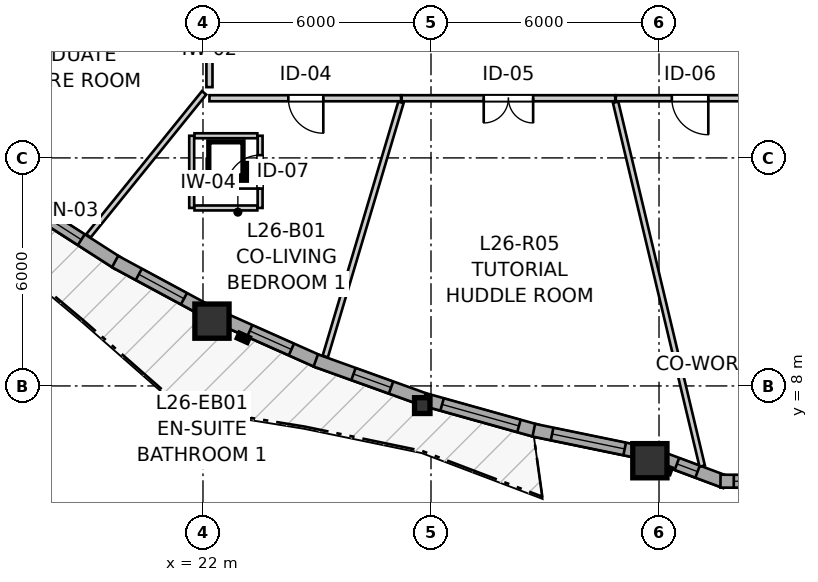
"""IFC4 building model, lengths in metres.
Left out: names, types, materials, properties, quantities, classifications, styles, units other than length and angle.
Written with IfcOpenShell. Run it as: python <this file> out.ifc"""

import sys

from ifc_helpers import new_model, si_unit, direction, frame, frame_2d, origin, origin_2d, place, context, subcontext, project, spatial, rectangle, i_section, extrude, source, transform, mapped, element, fill, save


model = new_model("IFC4")
c1 = context("Model", 3, precision=1e-05, world=origin(), true_north=direction((0.0, 1.0)))
c2 = subcontext(c1, "Body", "Model", "MODEL_VIEW")
j1 = project(units=[si_unit("LENGTHUNIT", "METRE"), si_unit("PLANEANGLEUNIT", "RADIAN")], contexts=[c1])
p1 = place(None, origin())
s1 = spatial("IfcSite", under=j1, at=p1, CompositionType="ELEMENT")
p2 = place(p1, origin())
s2 = spatial("IfcBuilding", under=s1, at=p2, CompositionType="ELEMENT")
p3 = place(p2, frame((0.0, 0.0, 89.6)))
s3 = spatial("IfcBuildingStorey", under=s2, at=p3, CompositionType="ELEMENT", Elevation=89.6)
m1 = source(origin(), c2, "Body", "SweptSolid", [
    extrude(rectangle(XDim=0.9, YDim=0.9, at=origin_2d()), origin(), (0.0, 0.0, 1.0), 2.95),
])
p4 = place(p3, frame((22.236, 9.705, 0.0), z_axis=(0.0, 0.0, 1.0), x_axis=(1.0, 0.0, 0.0)))
e1 = element("IfcColumn", 1, at=p4, inside=s3, PredefinedType="COLUMN", context=c2, shape_type="MappedRepresentation", body=[
    mapped(m1, transform((0.0, 0.0, 0.0), x_axis=(1.0, 0.0, 0.0), y_axis=(0.0, 1.0, 0.0), z_axis=(0.0, 0.0, 1.0), scale=1.0)),
])
m2 = source(origin(), c2, "Body", "SweptSolid", [
    extrude(i_section(OverallWidth=0.406, OverallDepth=0.416, WebThickness=0.027, FlangeThickness=0.044, FilletRadius=0.015, at=origin_2d()), origin(), (0.0, 0.0, 1.0), 2.95),
])
p5 = place(p3, frame((27.77, 7.483, 0.0), z_axis=(0.0, 0.0, 1.0), x_axis=(1.0, 0.0, 0.0)))
e2 = element("IfcColumn", 2, at=p5, inside=s3, PredefinedType="PILASTER", context=c2, shape_type="MappedRepresentation", body=[
    mapped(m2, transform((0.0, 0.0, 0.0), x_axis=(1.0, 0.0, 0.0), y_axis=(0.0, 1.0, 0.0), z_axis=(0.0, 0.0, 1.0), scale=1.0)),
])
p6 = place(p3, frame((33.76, 6.032, 0.0), z_axis=(0.0, 0.0, 1.0), x_axis=(1.0, 0.0, 0.0)))
e3 = element("IfcColumn", 3, at=p6, inside=s3, PredefinedType="COLUMN", context=c2, shape_type="MappedRepresentation", body=[
    mapped(m1, transform((0.0, 0.0, 0.0), x_axis=(1.0, 0.0, 0.0), y_axis=(0.0, 1.0, 0.0), z_axis=(0.0, 0.0, 1.0), scale=1.0)),
])
p7 = place(p3, frame((17.266, 12.832, 0.0), z_axis=(0.0, 0.0, 1.0), x_axis=(0.841493702039, -0.540266924241, 0.0)))
e4 = element("IfcWall", 4, at=p7, inside=s3, PredefinedType="SOLIDWALL", context=c2, shape_type="SweptSolid", body=[
    extrude(rectangle(XDim=2.968, YDim=0.34, at=frame_2d((1.484, 0.0))), origin(), (0.0, 0.0, 1.0), 2.48),
])
p8 = place(p7, frame((0.321, 0.0, 0.82)))
e5 = element("IfcOpeningElement", 5, at=p8, cuts=e4, PredefinedType="OPENING", context=c2, shape_type="SweptSolid", body=[
    extrude(rectangle(XDim=1.5, YDim=1.45, at=frame_2d((0.75, 0.725))), frame((0.0, 0.18, 0.0), z_axis=(0.0, -1.0, 0.0), x_axis=(1.0, 0.0, 0.0)), (0.0, 0.0, 1.0), 0.36),
])
p9 = place(p3, frame((19.687, 11.273, 0.0), z_axis=(0.0, 0.0, 1.0), x_axis=(0.880115534419, -0.474759566595, 0.0)))
e6 = element("IfcWall", 6, at=p9, inside=s3, PredefinedType="SOLIDWALL", context=c2, shape_type="SweptSolid", body=[
    extrude(rectangle(XDim=2.758, YDim=0.34, at=frame_2d((1.379, 0.0))), origin(), (0.0, 0.0, 1.0), 2.48),
])
p10 = place(p9, frame((0.709, 0.0, 0.82)))
e7 = element("IfcOpeningElement", 7, at=p10, cuts=e6, PredefinedType="OPENING", context=c2, shape_type="SweptSolid", body=[
    extrude(rectangle(XDim=1.35, YDim=1.45, at=frame_2d((0.675, 0.725))), frame((0.0, 0.18, 0.0), z_axis=(0.0, -1.0, 0.0), x_axis=(1.0, 0.0, 0.0)), (0.0, 0.0, 1.0), 0.36),
])
p11 = place(p3, frame((22.516, 9.767, 0.0), z_axis=(0.0, 0.0, 1.0), x_axis=(0.9134265589, -0.407003589046, 0.0)))
e8 = element("IfcWall", 8, at=p11, inside=s3, PredefinedType="SOLIDWALL", context=c2, shape_type="SweptSolid", body=[
    extrude(rectangle(XDim=2.775, YDim=0.34, at=frame_2d((1.387, 0.0))), origin(), (0.0, 0.0, 1.0), 2.48),
])
p12 = place(p11, frame((0.782, 0.0, 0.82)))
e9 = element("IfcOpeningElement", 9, at=p12, cuts=e8, PredefinedType="OPENING", context=c2, shape_type="SweptSolid", body=[
    extrude(rectangle(XDim=1.2, YDim=1.45, at=frame_2d((0.6, 0.725))), frame((0.0, 0.18, 0.0), z_axis=(0.0, -1.0, 0.0), x_axis=(1.0, 0.0, 0.0)), (0.0, 0.0, 1.0), 0.36),
])
p13 = place(p3, frame((24.968, 8.67, 0.0), z_axis=(0.0, 0.0, 1.0), x_axis=(0.941101658803, -0.33812374628, 0.0)))
e10 = element("IfcWall", 10, at=p13, inside=s3, PredefinedType="SOLIDWALL", context=c2, shape_type="SweptSolid", body=[
    extrude(rectangle(XDim=3.019, YDim=0.34, at=frame_2d((1.509, 0.0))), origin(), (0.0, 0.0, 1.0), 2.48),
])
p14 = place(p13, frame((1.055, 0.0, 0.82)))
e11 = element("IfcOpeningElement", 11, at=p14, cuts=e10, PredefinedType="OPENING", context=c2, shape_type="SweptSolid", body=[
    extrude(rectangle(XDim=1.05, YDim=1.45, at=frame_2d((0.525, 0.725))), frame((0.0, 0.18, 0.0), z_axis=(0.0, -1.0, 0.0), x_axis=(1.0, 0.0, 0.0)), (0.0, 0.0, 1.0), 0.36),
])
p15 = place(p3, frame((27.835, 7.641, 0.0), z_axis=(0.0, 0.0, 1.0), x_axis=(0.963049084537, -0.269325937802, 0.0)))
e12 = element("IfcWall", 12, at=p15, inside=s3, PredefinedType="SOLIDWALL", context=c2, shape_type="SweptSolid", body=[
    extrude(rectangle(XDim=3.068, YDim=0.34, at=frame_2d((1.534, 0.0))), origin(), (0.0, 0.0, 1.0), 2.48),
])
p16 = place(p15, frame((0.474, 0.0, 0.82)))
e13 = element("IfcOpeningElement", 13, at=p16, cuts=e12, PredefinedType="OPENING", context=c2, shape_type="SweptSolid", body=[
    extrude(rectangle(XDim=2.1, YDim=1.4, at=frame_2d((1.05, 0.7))), frame((0.0, 0.18, 0.0), z_axis=(0.0, -1.0, 0.0), x_axis=(1.0, 0.0, 0.0)), (0.0, 0.0, 1.0), 0.36),
])
p17 = place(p3, frame((30.705, 6.835, 0.0), z_axis=(0.0, 0.0, 1.0), x_axis=(0.979433750273, -0.201766024954, 0.0)))
e14 = element("IfcWall", 14, at=p17, inside=s3, PredefinedType="SOLIDWALL", context=c2, shape_type="SweptSolid", body=[
    extrude(rectangle(XDim=2.923, YDim=0.34, at=frame_2d((1.462, 0.0))), origin(), (0.0, 0.0, 1.0), 2.48),
])
p18 = place(p17, frame((0.492, 0.0, 0.82)))
e15 = element("IfcOpeningElement", 15, at=p18, cuts=e14, PredefinedType="OPENING", context=c2, shape_type="SweptSolid", body=[
    extrude(rectangle(XDim=1.95, YDim=1.4, at=frame_2d((0.975, 0.7))), frame((0.0, 0.18, 0.0), z_axis=(0.0, -1.0, 0.0), x_axis=(1.0, 0.0, 0.0)), (0.0, 0.0, 1.0), 0.36),
])
p19 = place(p3, frame((34.034, 6.111, 0.0), z_axis=(0.0, 0.0, 1.0), x_axis=(0.936815884802, -0.349822809409, 0.0)))
e16 = element("IfcWall", 16, at=p19, inside=s3, PredefinedType="SOLIDWALL", context=c2, shape_type="SweptSolid", body=[
    extrude(rectangle(XDim=1.831, YDim=0.34, at=frame_2d((0.916, 0.0))), origin(), (0.0, 0.0, 1.0), 2.48),
])
p20 = place(p19, frame((0.466, 0.0, 0.82)))
e17 = element("IfcOpeningElement", 17, at=p20, cuts=e16, PredefinedType="OPENING", context=c2, shape_type="SweptSolid", body=[
    extrude(rectangle(XDim=0.58, YDim=1.35, at=frame_2d((0.29, 0.675))), frame((0.0, 0.18, 0.0), z_axis=(0.0, -1.0, 0.0), x_axis=(1.0, 0.0, 0.0)), (0.0, 0.0, 1.0), 0.36),
])
p21 = place(p3, frame((35.618, 5.495, 0.0), z_axis=(0.0, 0.0, 1.0), x_axis=(0.999976451414, -0.006862697526, 0.0)))
e18 = element("IfcWall", 18, at=p21, inside=s3, PredefinedType="SOLIDWALL", context=c2, shape_type="SweptSolid", body=[
    extrude(rectangle(XDim=2.099, YDim=0.34, at=frame_2d((1.049, 0.0))), origin(), (0.0, 0.0, 1.0), 2.48),
])
p22 = place(p21, frame((0.35, 0.0, 0.82)))
e19 = element("IfcOpeningElement", 19, at=p22, cuts=e18, PredefinedType="OPENING", context=c2, shape_type="SweptSolid", body=[
    extrude(rectangle(XDim=1.4, YDim=1.35, at=frame_2d((0.7, 0.675))), frame((0.0, 0.18, 0.0), z_axis=(0.0, -1.0, 0.0), x_axis=(1.0, 0.0, 0.0)), (0.0, 0.0, 1.0), 0.36),
])
p23 = place(p3, frame((22.17, 15.862, 0.0), z_axis=(0.0, 0.0, 1.0), x_axis=(0.0, 1.0, 0.0)))
e20 = element("IfcWall", 20, at=p23, inside=s3, PredefinedType="PARTITIONING", context=c2, shape_type="SweptSolid", body=[
    extrude(rectangle(XDim=6.287, YDim=0.16, at=frame_2d((3.144, 0.0))), origin(), (0.0, 0.0, 1.0), 2.95),
])
p24 = place(p23, frame((2.498, 0.0, 0.0)))
e21 = element("IfcOpeningElement", 21, at=p24, cuts=e20, PredefinedType="OPENING", context=c2, shape_type="SweptSolid", body=[
    extrude(rectangle(XDim=1.3, YDim=2.1, at=frame_2d((0.65, 1.05))), frame((0.0, 0.09, 0.0), z_axis=(0.0, -1.0, 0.0), x_axis=(1.0, 0.0, 0.0)), (0.0, 0.0, 1.0), 0.18),
])
p25 = place(p3, frame((32.848, 15.57, 0.0), z_axis=(0.0, 0.0, 1.0), x_axis=(-1.0, 0.0, 0.0)))
e22 = element("IfcWall", 22, at=p25, inside=s3, PredefinedType="PARTITIONING", context=c2, shape_type="SweptSolid", body=[
    extrude(rectangle(XDim=5.621, YDim=0.16, at=frame_2d((2.811, 0.0))), origin(), (0.0, 0.0, 1.0), 2.95),
])
p26 = place(p25, frame((2.16, 0.0, 0.0)))
e23 = element("IfcOpeningElement", 23, at=p26, cuts=e22, PredefinedType="OPENING", context=c2, shape_type="SweptSolid", body=[
    extrude(rectangle(XDim=1.3, YDim=2.1, at=frame_2d((0.65, 1.05))), frame((0.0, 0.09, 0.0), z_axis=(0.0, -1.0, 0.0), x_axis=(1.0, 0.0, 0.0)), (0.0, 0.0, 1.0), 0.18),
])
p27 = place(p3, frame((27.212, 15.57, 0.0), z_axis=(0.0, 0.0, 1.0), x_axis=(-1.0, 0.0, 0.0)))
e24 = element("IfcWall", 24, at=p27, inside=s3, PredefinedType="PARTITIONING", context=c2, shape_type="SweptSolid", body=[
    extrude(rectangle(XDim=5.042, YDim=0.16, at=frame_2d((2.521, 0.0))), origin(), (0.0, 0.0, 1.0), 2.95),
])
p28 = place(p27, frame((2.046, 0.0, 0.0)))
e25 = element("IfcOpeningElement", 25, at=p28, cuts=e24, PredefinedType="OPENING", context=c2, shape_type="SweptSolid", body=[
    extrude(rectangle(XDim=0.92, YDim=2.1, at=frame_2d((0.46, 1.05))), frame((0.0, 0.09, 0.0), z_axis=(0.0, -1.0, 0.0), x_axis=(1.0, 0.0, 0.0)), (0.0, 0.0, 1.0), 0.18),
])
p29 = place(p3, frame((36.819, 15.57, 0.0), z_axis=(0.0, 0.0, 1.0), x_axis=(-1.0, 0.0, 0.0)))
e26 = element("IfcWall", 26, at=p29, inside=s3, PredefinedType="PARTITIONING", context=c2, shape_type="SweptSolid", body=[
    extrude(rectangle(XDim=3.956, YDim=0.16, at=frame_2d((1.978, 0.0))), origin(), (0.0, 0.0, 1.0), 2.95),
])
p30 = place(p29, frame((1.522, 0.0, 0.0)))
e27 = element("IfcOpeningElement", 27, at=p30, cuts=e26, PredefinedType="OPENING", context=c2, shape_type="SweptSolid", body=[
    extrude(rectangle(XDim=0.96, YDim=2.1, at=frame_2d((0.48, 1.05))), frame((0.0, 0.09, 0.0), z_axis=(0.0, -1.0, 0.0), x_axis=(1.0, 0.0, 0.0)), (0.0, 0.0, 1.0), 0.18),
])
p31 = place(p3, frame((23.503, 12.683, 0.0), z_axis=(0.0, 0.0, 1.0), x_axis=(0.0, 1.0, 0.0)))
e28 = element("IfcWall", 28, at=p31, inside=s3, PredefinedType="PARTITIONING", context=c2, shape_type="SweptSolid", body=[
    extrude(rectangle(XDim=1.9, YDim=0.13, at=frame_2d((0.95, 0.0))), origin(), (0.0, 0.0, 1.0), 2.95),
])
p32 = place(p31, frame((0.51, 0.0, 0.0)))
e29 = element("IfcOpeningElement", 29, at=p32, cuts=e28, PredefinedType="OPENING", context=c2, shape_type="SweptSolid", body=[
    extrude(rectangle(XDim=0.88, YDim=2.05, at=frame_2d((0.44, 1.025))), frame((0.0, 0.075, 0.0), z_axis=(0.0, -1.0, 0.0), x_axis=(1.0, 0.0, 0.0)), (0.0, 0.0, 1.0), 0.15),
])
p33 = place(p3, frame((32.858, 15.465, 0.0), z_axis=(0.0, 0.0, 1.0), x_axis=(0.231516552249, -0.97283096478, 0.0)))
e30 = element("IfcWall", 30, at=p33, inside=s3, PredefinedType="PARTITIONING", context=c2, shape_type="SweptSolid", body=[
    extrude(rectangle(XDim=9.841, YDim=0.145, at=frame_2d((4.92, 0.0))), origin(), (0.0, 0.0, 1.0), 2.95),
])
p34 = place(p3, frame((25.217, 8.774, 0.0), z_axis=(0.0, 0.0, 1.0), x_axis=(0.28553060174, 0.958369592313, 0.0)))
e31 = element("IfcWall", 31, at=p34, inside=s3, PredefinedType="PARTITIONING", context=c2, shape_type="SweptSolid", body=[
    extrude(rectangle(XDim=6.978, YDim=0.145, at=frame_2d((3.489, 0.0))), origin(), (0.0, 0.0, 1.0), 2.95),
])
p35 = place(p3, frame((18.986, 11.948, 0.0), z_axis=(0.0, 0.0, 1.0), x_axis=(0.628820808954, 0.777550249326, 0.0)))
e32 = element("IfcWall", 32, at=p35, inside=s3, PredefinedType="PARTITIONING", context=c2, shape_type="SweptSolid", body=[
    extrude(rectangle(XDim=4.839, YDim=0.145, at=frame_2d((2.419, 0.0))), origin(), (0.0, 0.0, 1.0), 2.95),
])
p36 = place(p3, frame((21.703, 12.683, 0.0), z_axis=(0.0, 0.0, 1.0), x_axis=(0.0, 1.0, 0.0)))
e33 = element("IfcWall", 33, at=p36, inside=s3, PredefinedType="PARTITIONING", context=c2, shape_type="SweptSolid", body=[
    extrude(rectangle(XDim=1.9, YDim=0.13, at=frame_2d((0.95, 0.0))), origin(), (0.0, 0.0, 1.0), 2.95),
])
for number, where, z_axis, x_axis in (
    (34, (21.776, 14.583, 0.0), (0.0, 0.0, 1.0), (1.0, 0.0, 0.0)),
    (35, (21.776, 12.683, 0.0), (0.0, 0.0, 1.0), (1.0, 0.0, 0.0)),
):
    element("IfcWall", number, at=place(p3, frame(where, z_axis=z_axis, x_axis=x_axis)), inside=s3, PredefinedType="PARTITIONING", context=c2, shape_type="SweptSolid", body=[
        extrude(rectangle(XDim=1.654, YDim=0.13, at=frame_2d((0.827, 0.0))), origin(), (0.0, 0.0, 1.0), 2.95),
    ])
m3 = source(origin(), c2, "Body", "SweptSolid", [
    extrude(rectangle(XDim=1.5, YDim=1.45, at=frame_2d((0.75, 0.725))), frame((0.0, 0.03, 0.0), z_axis=(0.0, -1.0, 0.0), x_axis=(1.0, 0.0, 0.0)), (0.0, 0.0, 1.0), 0.06),
])
p37 = place(p8, origin())
e36 = element("IfcWindow", 36, at=p37, inside=s3, PartitioningType="SINGLE_PANEL", PredefinedType="WINDOW", context=c2, shape_type="MappedRepresentation", body=[
    mapped(m3, transform((0.0, 0.0, 0.0), x_axis=(1.0, 0.0, 0.0), y_axis=(0.0, 1.0, 0.0), z_axis=(0.0, 0.0, 1.0), scale=1.0)),
])
fill(e5, e36)
m4 = source(origin(), c2, "Body", "SweptSolid", [
    extrude(rectangle(XDim=1.35, YDim=1.45, at=frame_2d((0.675, 0.725))), frame((0.0, 0.03, 0.0), z_axis=(0.0, -1.0, 0.0), x_axis=(1.0, 0.0, 0.0)), (0.0, 0.0, 1.0), 0.06),
])
p38 = place(p10, origin())
e37 = element("IfcWindow", 37, at=p38, inside=s3, PartitioningType="SINGLE_PANEL", PredefinedType="WINDOW", context=c2, shape_type="MappedRepresentation", body=[
    mapped(m4, transform((0.0, 0.0, 0.0), x_axis=(1.0, 0.0, 0.0), y_axis=(0.0, 1.0, 0.0), z_axis=(0.0, 0.0, 1.0), scale=1.0)),
])
fill(e7, e37)
m5 = source(origin(), c2, "Body", "SweptSolid", [
    extrude(rectangle(XDim=1.2, YDim=1.45, at=frame_2d((0.6, 0.725))), frame((0.0, 0.03, 0.0), z_axis=(0.0, -1.0, 0.0), x_axis=(1.0, 0.0, 0.0)), (0.0, 0.0, 1.0), 0.06),
])
p39 = place(p12, origin())
e38 = element("IfcWindow", 38, at=p39, inside=s3, PartitioningType="SINGLE_PANEL", PredefinedType="WINDOW", context=c2, shape_type="MappedRepresentation", body=[
    mapped(m5, transform((0.0, 0.0, 0.0), x_axis=(1.0, 0.0, 0.0), y_axis=(0.0, 1.0, 0.0), z_axis=(0.0, 0.0, 1.0), scale=1.0)),
])
fill(e9, e38)
m6 = source(origin(), c2, "Body", "SweptSolid", [
    extrude(rectangle(XDim=1.05, YDim=1.45, at=frame_2d((0.525, 0.725))), frame((0.0, 0.03, 0.0), z_axis=(0.0, -1.0, 0.0), x_axis=(1.0, 0.0, 0.0)), (0.0, 0.0, 1.0), 0.06),
])
p40 = place(p14, origin())
e39 = element("IfcWindow", 39, at=p40, inside=s3, PartitioningType="SINGLE_PANEL", PredefinedType="WINDOW", context=c2, shape_type="MappedRepresentation", body=[
    mapped(m6, transform((0.0, 0.0, 0.0), x_axis=(1.0, 0.0, 0.0), y_axis=(0.0, 1.0, 0.0), z_axis=(0.0, 0.0, 1.0), scale=1.0)),
])
fill(e11, e39)
m7 = source(origin(), c2, "Body", "SweptSolid", [
    extrude(rectangle(XDim=2.1, YDim=1.4, at=frame_2d((1.05, 0.7))), frame((0.0, 0.03, 0.0), z_axis=(0.0, -1.0, 0.0), x_axis=(1.0, 0.0, 0.0)), (0.0, 0.0, 1.0), 0.06),
])
p41 = place(p16, origin())
e40 = element("IfcWindow", 40, at=p41, inside=s3, PartitioningType="SINGLE_PANEL", PredefinedType="WINDOW", context=c2, shape_type="MappedRepresentation", body=[
    mapped(m7, transform((0.0, 0.0, 0.0), x_axis=(1.0, 0.0, 0.0), y_axis=(0.0, 1.0, 0.0), z_axis=(0.0, 0.0, 1.0), scale=1.0)),
])
fill(e13, e40)
m8 = source(origin(), c2, "Body", "SweptSolid", [
    extrude(rectangle(XDim=1.95, YDim=1.4, at=frame_2d((0.975, 0.7))), frame((0.0, 0.03, 0.0), z_axis=(0.0, -1.0, 0.0), x_axis=(1.0, 0.0, 0.0)), (0.0, 0.0, 1.0), 0.06),
])
p42 = place(p18, origin())
e41 = element("IfcWindow", 41, at=p42, inside=s3, PartitioningType="SINGLE_PANEL", PredefinedType="WINDOW", context=c2, shape_type="MappedRepresentation", body=[
    mapped(m8, transform((0.0, 0.0, 0.0), x_axis=(1.0, 0.0, 0.0), y_axis=(0.0, 1.0, 0.0), z_axis=(0.0, 0.0, 1.0), scale=1.0)),
])
fill(e15, e41)
m9 = source(origin(), c2, "Body", "SweptSolid", [
    extrude(rectangle(XDim=0.58, YDim=1.35, at=frame_2d((0.29, 0.675))), frame((0.0, 0.03, 0.0), z_axis=(0.0, -1.0, 0.0), x_axis=(1.0, 0.0, 0.0)), (0.0, 0.0, 1.0), 0.06),
])
p43 = place(p20, origin())
e42 = element("IfcWindow", 42, at=p43, inside=s3, PartitioningType="SINGLE_PANEL", PredefinedType="WINDOW", context=c2, shape_type="MappedRepresentation", body=[
    mapped(m9, transform((0.0, 0.0, 0.0), x_axis=(1.0, 0.0, 0.0), y_axis=(0.0, 1.0, 0.0), z_axis=(0.0, 0.0, 1.0), scale=1.0)),
])
fill(e17, e42)
m10 = source(origin(), c2, "Body", "SweptSolid", [
    extrude(rectangle(XDim=1.4, YDim=1.35, at=frame_2d((0.7, 0.675))), frame((0.0, 0.03, 0.0), z_axis=(0.0, -1.0, 0.0), x_axis=(1.0, 0.0, 0.0)), (0.0, 0.0, 1.0), 0.06),
])
p44 = place(p22, origin())
e43 = element("IfcWindow", 43, at=p44, inside=s3, PartitioningType="SINGLE_PANEL", PredefinedType="WINDOW", context=c2, shape_type="MappedRepresentation", body=[
    mapped(m10, transform((0.0, 0.0, 0.0), x_axis=(1.0, 0.0, 0.0), y_axis=(0.0, 1.0, 0.0), z_axis=(0.0, 0.0, 1.0), scale=1.0)),
])
fill(e19, e43)
m11 = source(origin(), c2, "Body", "SweptSolid", [
    extrude(rectangle(XDim=1.3, YDim=2.1, at=frame_2d((0.65, 1.05))), frame((0.0, 0.025, 0.0), z_axis=(0.0, -1.0, 0.0), x_axis=(1.0, 0.0, 0.0)), (0.0, 0.0, 1.0), 0.05),
])
p45 = place(p26, origin())
e44 = element("IfcDoor", 44, at=p45, inside=s3, OperationType="DOUBLE_DOOR_SINGLE_SWING", PredefinedType="DOOR", context=c2, shape_type="MappedRepresentation", body=[
    mapped(m11, transform((0.0, 0.0, 0.0), x_axis=(1.0, 0.0, 0.0), y_axis=(0.0, 1.0, 0.0), z_axis=(0.0, 0.0, 1.0), scale=1.0)),
])
fill(e23, e44)
m12 = source(origin(), c2, "Body", "SweptSolid", [
    extrude(rectangle(XDim=0.92, YDim=2.1, at=frame_2d((0.46, 1.05))), frame((0.0, 0.025, 0.0), z_axis=(0.0, -1.0, 0.0), x_axis=(1.0, 0.0, 0.0)), (0.0, 0.0, 1.0), 0.05),
])
p46 = place(p28, origin())
e45 = element("IfcDoor", 45, at=p46, inside=s3, OperationType="SINGLE_SWING_LEFT", PredefinedType="DOOR", context=c2, shape_type="MappedRepresentation", body=[
    mapped(m12, transform((0.0, 0.0, 0.0), x_axis=(1.0, 0.0, 0.0), y_axis=(0.0, 1.0, 0.0), z_axis=(0.0, 0.0, 1.0), scale=1.0)),
])
fill(e25, e45)
m13 = source(origin(), c2, "Body", "SweptSolid", [
    extrude(rectangle(XDim=0.96, YDim=2.1, at=frame_2d((0.48, 1.05))), frame((0.0, 0.025, 0.0), z_axis=(0.0, -1.0, 0.0), x_axis=(1.0, 0.0, 0.0)), (0.0, 0.0, 1.0), 0.05),
])
p47 = place(p30, origin())
e46 = element("IfcDoor", 46, at=p47, inside=s3, OperationType="SINGLE_SWING_LEFT", PredefinedType="DOOR", context=c2, shape_type="MappedRepresentation", body=[
    mapped(m13, transform((0.0, 0.0, 0.0), x_axis=(1.0, 0.0, 0.0), y_axis=(0.0, 1.0, 0.0), z_axis=(0.0, 0.0, 1.0), scale=1.0)),
])
fill(e27, e46)
m14 = source(origin(), c2, "Body", "SweptSolid", [
    extrude(rectangle(XDim=0.88, YDim=2.05, at=frame_2d((0.44, 1.025))), frame((0.0, 0.025, 0.0), z_axis=(0.0, -1.0, 0.0), x_axis=(1.0, 0.0, 0.0)), (0.0, 0.0, 1.0), 0.05),
])
p48 = place(p32, origin())
e47 = element("IfcDoor", 47, at=p48, inside=s3, OperationType="SINGLE_SWING_LEFT", PredefinedType="DOOR", context=c2, shape_type="MappedRepresentation", body=[
    mapped(m14, transform((0.0, 0.0, 0.0), x_axis=(1.0, 0.0, 0.0), y_axis=(0.0, 1.0, 0.0), z_axis=(0.0, 0.0, 1.0), scale=1.0)),
])
fill(e29, e47)
save(model, sys.argv[1])
